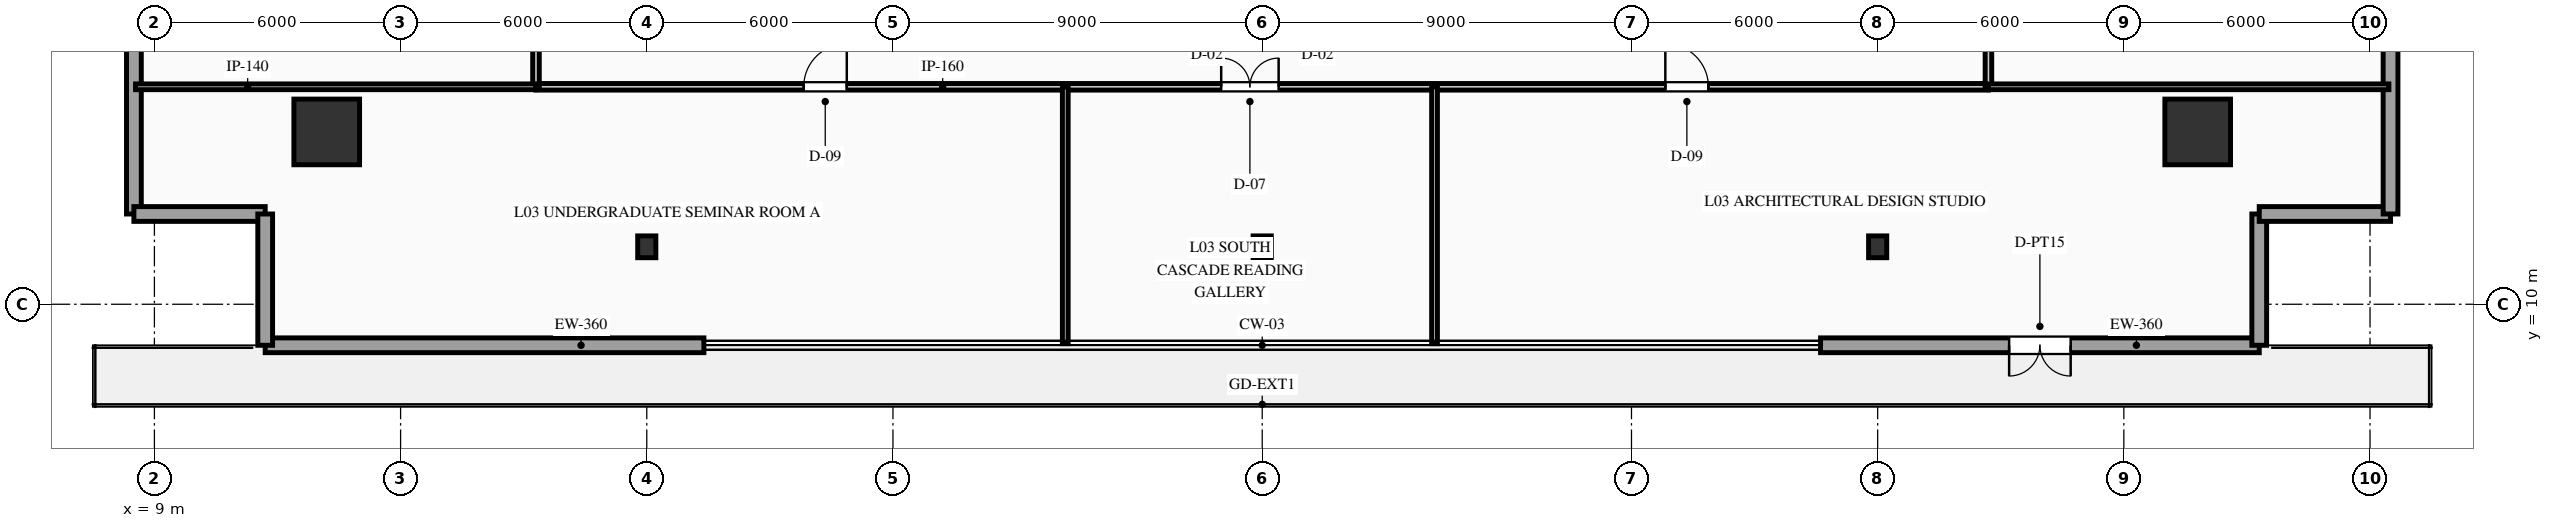
"""IFC4 building model, lengths in metres.
Left out: names, types, materials, properties, quantities, classifications, styles, units other than length and angle.
Written with IfcOpenShell. Run it as: python <this file> out.ifc"""

import sys

from ifc_helpers import new_model, si_unit, direction, frame, frame_2d, origin, origin_2d, place, context, subcontext, project, spatial, rectangle, hollow_rectangle, i_section, extrude, element, fill, save


model = new_model("IFC4")
c1 = context("Model", 3, precision=1e-05, world=origin(), true_north=direction((0.0, 1.0)))
c2 = subcontext(c1, "Body", "Model", "MODEL_VIEW")
j1 = project(units=[si_unit("LENGTHUNIT", "METRE"), si_unit("PLANEANGLEUNIT", "RADIAN")], contexts=[c1])
p1 = place(None, origin())
s1 = spatial("IfcSite", under=j1, at=p1, CompositionType="ELEMENT")
p2 = place(p1, origin())
s2 = spatial("IfcBuilding", under=s1, at=p2, CompositionType="ELEMENT")
p3 = place(p2, frame((0.0, 0.0, 16.8)))
s3 = spatial("IfcBuildingStorey", under=s2, at=p3, CompositionType="ELEMENT", Elevation=16.8)
for number, where, z_axis, x_axis in (
    (1, (13.2, 14.2, 0.0), (0.0, 0.0, 1.0), (1.0, 0.0, 0.0)),
    (2, (58.8, 14.2, 0.0), (0.0, 0.0, 1.0), (1.0, 0.0, 0.0)),
):
    element("IfcColumn", number, at=place(p3, frame(where, z_axis=z_axis, x_axis=x_axis)), inside=s3, PredefinedType="COLUMN", context=c2, shape_type="SweptSolid", body=[
        extrude(hollow_rectangle(XDim=1.6, YDim=1.6, WallThickness=0.08, at=origin_2d()), origin(), (0.0, 0.0, 1.0), 5.4),
    ])
for number, where, z_axis, x_axis in (
    (3, (21.0, 11.4, 0.0), (0.0, 0.0, 1.0), (1.0, 0.0, 0.0)),
    (4, (51.0, 11.4, 0.0), (0.0, 0.0, 1.0), (1.0, 0.0, 0.0)),
    (5, (36.0, 11.4, 0.0), (0.0, 0.0, 1.0), (1.0, 0.0, 0.0)),
):
    element("IfcColumn", number, at=place(p3, frame(where, z_axis=z_axis, x_axis=x_axis)), inside=s3, PredefinedType="COLUMN", context=c2, shape_type="SweptSolid", body=[
        extrude(i_section(OverallWidth=0.442, OverallDepth=0.531, WebThickness=0.066, FlangeThickness=0.106, at=origin_2d()), origin(), (0.0, 0.0, 1.0), 5.4),
    ])
p4 = place(p3, frame((60.3, 9.0, 0.0), z_axis=(0.0, 0.0, 1.0), x_axis=(-1.0, 0.0, 0.0)))
e6 = element("IfcWall", 6, at=p4, inside=s3, PredefinedType="STANDARD", context=c2, shape_type="SweptSolid", body=[
    extrude(rectangle(XDim=10.692, YDim=0.36, at=frame_2d((5.346, 0.0))), origin(), (0.0, 0.0, 1.0), 4.98),
])
p5 = place(p4, frame((4.596, 0.0, 0.0)))
e7 = element("IfcOpeningElement", 7, at=p5, cuts=e6, PredefinedType="OPENING", context=c2, shape_type="SweptSolid", body=[
    extrude(rectangle(XDim=1.5, YDim=2.25, at=frame_2d((0.75, 1.125))), frame((0.0, 0.19, 0.0), z_axis=(0.0, -1.0, 0.0), x_axis=(1.0, 0.0, 0.0)), (0.0, 0.0, 1.0), 0.38),
])
p6 = place(p3, frame((22.392, 9.0, 0.0), z_axis=(0.0, 0.0, 1.0), x_axis=(-1.0, 0.0, 0.0)))
e8 = element("IfcWall", 8, at=p6, inside=s3, PredefinedType="STANDARD", context=c2, shape_type="SweptSolid", body=[
    extrude(rectangle(XDim=10.692, YDim=0.36, at=frame_2d((5.346, 0.0))), origin(), (0.0, 0.0, 1.0), 4.98),
])
for number, where, z_axis, x_axis in (
    (9, (60.3, 12.2, 0.0), (0.0, 0.0, 1.0), (0.0, -1.0, 0.0)),
    (10, (63.5, 12.2, 0.0), (0.0, 0.0, 1.0), (-1.0, 0.0, 0.0)),
):
    element("IfcWall", number, at=place(p3, frame(where, z_axis=z_axis, x_axis=x_axis)), inside=s3, PredefinedType="STANDARD", context=c2, shape_type="SweptSolid", body=[
        extrude(rectangle(XDim=3.2, YDim=0.36, at=frame_2d((1.6, 0.0))), origin(), (0.0, 0.0, 1.0), 4.98),
    ])
p7 = place(p3, frame((63.5, 43.6, 0.0), z_axis=(0.0, 0.0, 1.0), x_axis=(0.0, -1.0, 0.0)))
e11 = element("IfcWall", 11, at=p7, inside=s3, PredefinedType="STANDARD", context=c2, shape_type="SweptSolid", body=[
    extrude(rectangle(XDim=31.4, YDim=0.36, at=frame_2d((15.7, 0.0))), origin(), (0.0, 0.0, 1.0), 4.98),
])
p8 = place(p7, frame((8.792, 0.0, 1.0)))
e12 = element("IfcOpeningElement", 12, at=p8, cuts=e11, PredefinedType="OPENING", context=c2, shape_type="SweptSolid", body=[
    extrude(rectangle(XDim=1.4, YDim=2.2, at=frame_2d((0.7, 1.1))), frame((0.0, 0.19, 0.0), z_axis=(0.0, -1.0, 0.0), x_axis=(1.0, 0.0, 0.0)), (0.0, 0.0, 1.0), 0.38),
])
p9 = place(p3, frame((8.5, 12.2, 0.0), z_axis=(0.0, 0.0, 1.0), x_axis=(0.0, 1.0, 0.0)))
e13 = element("IfcWall", 13, at=p9, inside=s3, PredefinedType="STANDARD", context=c2, shape_type="SweptSolid", body=[
    extrude(rectangle(XDim=31.4, YDim=0.36, at=frame_2d((15.7, 0.0))), origin(), (0.0, 0.0, 1.0), 4.98),
])
p10 = place(p9, frame((8.792, 0.0, 1.0)))
e14 = element("IfcOpeningElement", 14, at=p10, cuts=e13, PredefinedType="OPENING", context=c2, shape_type="SweptSolid", body=[
    extrude(rectangle(XDim=1.4, YDim=2.2, at=frame_2d((0.7, 1.1))), frame((0.0, 0.19, 0.0), z_axis=(0.0, -1.0, 0.0), x_axis=(1.0, 0.0, 0.0)), (0.0, 0.0, 1.0), 0.38),
])
for number, where, z_axis, x_axis in (
    (15, (11.7, 12.2, 0.0), (0.0, 0.0, 1.0), (-1.0, 0.0, 0.0)),
    (16, (11.7, 9.0, 0.0), (0.0, 0.0, 1.0), (0.0, 1.0, 0.0)),
):
    element("IfcWall", number, at=place(p3, frame(where, z_axis=z_axis, x_axis=x_axis)), inside=s3, PredefinedType="STANDARD", context=c2, shape_type="SweptSolid", body=[
        extrude(rectangle(XDim=3.2, YDim=0.36, at=frame_2d((1.6, 0.0))), origin(), (0.0, 0.0, 1.0), 4.98),
    ])
p11 = place(p3, frame((18.3, 15.3, 0.0), z_axis=(0.0, 0.0, 1.0), x_axis=(1.0, 0.0, 0.0)))
e17 = element("IfcWall", 17, at=p11, inside=s3, PredefinedType="PARTITIONING", context=c2, shape_type="SweptSolid", body=[
    extrude(rectangle(XDim=35.4, YDim=0.16, at=frame_2d((17.7, 0.0))), origin(), (0.0, 0.0, 1.0), 4.202),
])
p12 = place(p11, frame((6.525, 0.0, 0.0)))
e18 = element("IfcOpeningElement", 18, at=p12, cuts=e17, PredefinedType="OPENING", context=c2, shape_type="SweptSolid", body=[
    extrude(rectangle(XDim=1.05, YDim=2.15, at=frame_2d((0.525, 1.075))), frame((0.0, 0.09, 0.0), z_axis=(0.0, -1.0, 0.0), x_axis=(1.0, 0.0, 0.0)), (0.0, 0.0, 1.0), 0.18),
])
p13 = place(p11, frame((16.7, 0.0, 0.0)))
e19 = element("IfcOpeningElement", 19, at=p13, cuts=e17, PredefinedType="OPENING", context=c2, shape_type="SweptSolid", body=[
    extrude(rectangle(XDim=1.4, YDim=2.2, at=frame_2d((0.7, 1.1))), frame((0.0, 0.09, 0.0), z_axis=(0.0, -1.0, 0.0), x_axis=(1.0, 0.0, 0.0)), (0.0, 0.0, 1.0), 0.18),
])
p14 = place(p11, frame((27.525, 0.0, 0.0)))
e20 = element("IfcOpeningElement", 20, at=p14, cuts=e17, PredefinedType="OPENING", context=c2, shape_type="SweptSolid", body=[
    extrude(rectangle(XDim=1.05, YDim=2.15, at=frame_2d((0.525, 1.075))), frame((0.0, 0.09, 0.0), z_axis=(0.0, -1.0, 0.0), x_axis=(1.0, 0.0, 0.0)), (0.0, 0.0, 1.0), 0.18),
])
p15 = place(p3, frame((18.3, 15.3, 0.0), z_axis=(0.0, 0.0, 1.0), x_axis=(0.0, 1.0, 0.0)))
e21 = element("IfcWall", 21, at=p15, inside=s3, PredefinedType="PARTITIONING", context=c2, shape_type="SweptSolid", body=[
    extrude(rectangle(XDim=6.55, YDim=0.16, at=frame_2d((3.275, 0.0))), origin(), (0.0, 0.0, 1.0), 4.98),
])
p16 = place(p15, frame((3.2, 0.0, 0.0)))
e22 = element("IfcOpeningElement", 22, at=p16, cuts=e21, PredefinedType="OPENING", context=c2, shape_type="SweptSolid", body=[
    extrude(rectangle(XDim=1.4, YDim=2.2, at=frame_2d((0.7, 1.1))), frame((0.0, 0.09, 0.0), z_axis=(0.0, -1.0, 0.0), x_axis=(1.0, 0.0, 0.0)), (0.0, 0.0, 1.0), 0.18),
])
p17 = place(p3, frame((53.7, 15.3, 0.0), z_axis=(0.0, 0.0, 1.0), x_axis=(0.0, 1.0, 0.0)))
e23 = element("IfcWall", 23, at=p17, inside=s3, PredefinedType="PARTITIONING", context=c2, shape_type="SweptSolid", body=[
    extrude(rectangle(XDim=6.55, YDim=0.16, at=frame_2d((3.275, 0.0))), origin(), (0.0, 0.0, 1.0), 4.98),
])
p18 = place(p17, frame((3.2, 0.0, 0.0)))
e24 = element("IfcOpeningElement", 24, at=p18, cuts=e23, PredefinedType="OPENING", context=c2, shape_type="SweptSolid", body=[
    extrude(rectangle(XDim=1.4, YDim=2.2, at=frame_2d((0.7, 1.1))), frame((0.0, 0.09, 0.0), z_axis=(0.0, -1.0, 0.0), x_axis=(1.0, 0.0, 0.0)), (0.0, 0.0, 1.0), 0.18),
])
for number, where, z_axis, x_axis in (
    (25, (8.54, 15.3, 0.0), (0.0, 0.0, 1.0), (1.0, 0.0, 0.0)),
    (26, (53.7, 15.3, 0.0), (0.0, 0.0, 1.0), (1.0, 0.0, 0.0)),
):
    element("IfcWall", number, at=place(p3, frame(where, z_axis=z_axis, x_axis=x_axis)), inside=s3, PredefinedType="PARTITIONING", context=c2, shape_type="SweptSolid", body=[
        extrude(rectangle(XDim=9.76, YDim=0.14, at=frame_2d((4.88, 0.0))), origin(), (0.0, 0.0, 1.0), 4.202),
    ])
for number, where, z_axis, x_axis in (
    (27, (31.2, 9.04, 0.0), (0.0, 0.0, 1.0), (0.0, 1.0, 0.0)),
    (28, (40.2, 9.04, 0.0), (0.0, 0.0, 1.0), (0.0, 1.0, 0.0)),
):
    element("IfcWall", number, at=place(p3, frame(where, z_axis=z_axis, x_axis=x_axis)), inside=s3, PredefinedType="PARTITIONING", context=c2, shape_type="SweptSolid", body=[
        extrude(rectangle(XDim=6.26, YDim=0.14, at=frame_2d((3.13, 0.0))), origin(), (0.0, 0.0, 1.0), 4.98),
    ])
p19 = place(p5, origin())
e29 = element("IfcDoor", 29, at=p19, inside=s3, OperationType="DOUBLE_DOOR_SINGLE_SWING", PredefinedType="DOOR", context=c2, shape_type="SweptSolid", body=[
    extrude(rectangle(XDim=1.5, YDim=2.25, at=frame_2d((0.75, 1.125))), frame((0.0, 0.025, 0.0), z_axis=(0.0, -1.0, 0.0), x_axis=(1.0, 0.0, 0.0)), (0.0, 0.0, 1.0), 0.05),
])
fill(e7, e29)
p20 = place(p12, origin())
e30 = element("IfcDoor", 30, at=p20, inside=s3, OperationType="SINGLE_SWING_RIGHT", PredefinedType="DOOR", context=c2, shape_type="SweptSolid", body=[
    extrude(rectangle(XDim=1.05, YDim=2.15, at=frame_2d((0.525, 1.075))), frame((0.0, 0.025, 0.0), z_axis=(0.0, -1.0, 0.0), x_axis=(1.0, 0.0, 0.0)), (0.0, 0.0, 1.0), 0.05),
])
fill(e18, e30)
p21 = place(p13, origin())
e31 = element("IfcDoor", 31, at=p21, inside=s3, OperationType="DOUBLE_DOOR_SINGLE_SWING", PredefinedType="DOOR", context=c2, shape_type="SweptSolid", body=[
    extrude(rectangle(XDim=1.4, YDim=2.2, at=frame_2d((0.7, 1.1))), frame((0.0, 0.025, 0.0), z_axis=(0.0, -1.0, 0.0), x_axis=(1.0, 0.0, 0.0)), (0.0, 0.0, 1.0), 0.05),
])
fill(e19, e31)
p22 = place(p14, origin())
e32 = element("IfcDoor", 32, at=p22, inside=s3, OperationType="SINGLE_SWING_LEFT", PredefinedType="DOOR", context=c2, shape_type="SweptSolid", body=[
    extrude(rectangle(XDim=1.05, YDim=2.15, at=frame_2d((0.525, 1.075))), frame((0.0, 0.025, 0.0), z_axis=(0.0, -1.0, 0.0), x_axis=(1.0, 0.0, 0.0)), (0.0, 0.0, 1.0), 0.05),
])
fill(e20, e32)
save(model, sys.argv[1])
